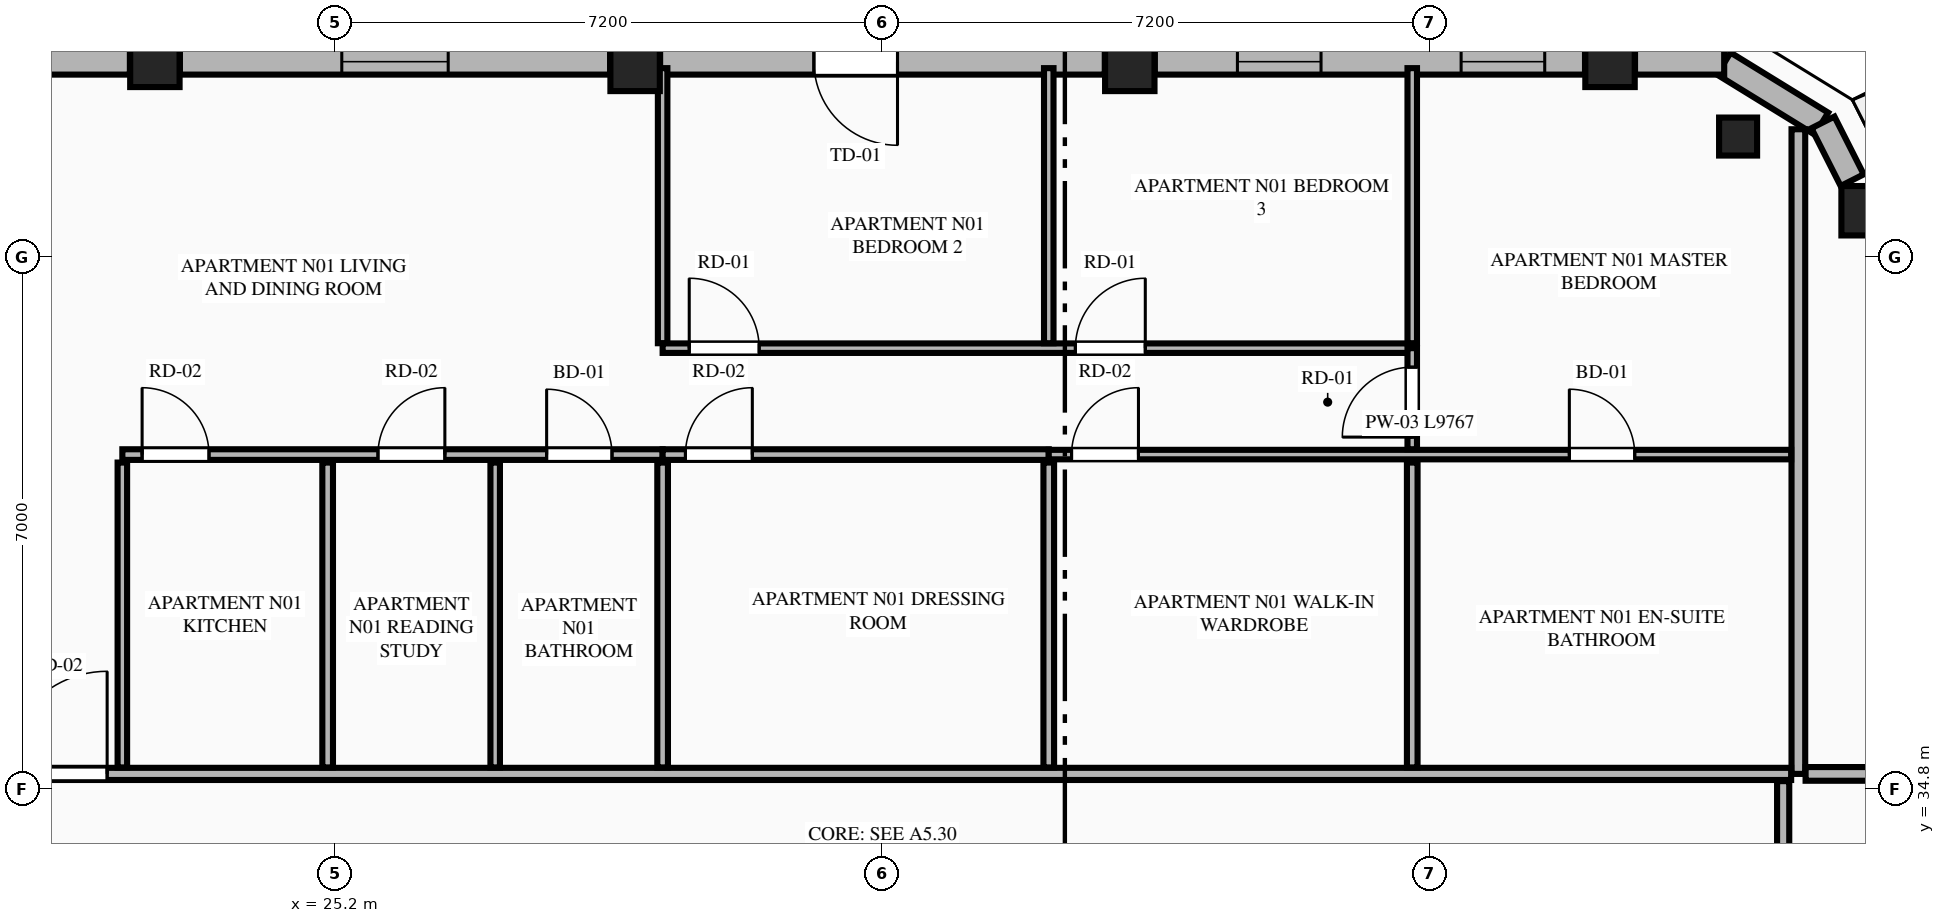
"""IFC4 building model, lengths in metres.
Left out: names, types, materials, properties, quantities, classifications, styles, units other than length and angle.
Written with IfcOpenShell. Run it as: python <this file> out.ifc"""

import sys

from ifc_helpers import new_model, si_unit, direction, frame, frame_2d, origin, origin_2d, place, context, subcontext, project, spatial, rectangle, extrude, element, fill, save


model = new_model("IFC4")
c1 = context("Model", 3, precision=1e-05, world=origin(), true_north=direction((0.0, 1.0)))
c2 = subcontext(c1, "Body", "Model", "MODEL_VIEW")
j1 = project(units=[si_unit("LENGTHUNIT", "METRE"), si_unit("PLANEANGLEUNIT", "RADIAN")], contexts=[c1])
p1 = place(None, origin())
s1 = spatial("IfcSite", under=j1, at=p1, CompositionType="ELEMENT")
p2 = place(p1, origin())
s2 = spatial("IfcBuilding", under=s1, at=p2, CompositionType="ELEMENT")
p3 = place(p2, frame((0.0, 0.0, 267.15)))
s3 = spatial("IfcBuildingStorey", under=s2, at=p3, CompositionType="ELEMENT", Elevation=267.15)
for number, where, z_axis, x_axis in (
    (1, (45.341, 42.409, 0.0), (0.0, 0.0, 1.0), (1.0, 0.0, 0.0)),
    (2, (41.972, 44.361, 0.0), (0.0, 0.0, 1.0), (1.0, 0.0, 0.0)),
    (3, (35.654, 44.308, 0.0), (0.0, 0.0, 1.0), (1.0, 0.0, 0.0)),
    (4, (29.146, 44.308, 0.0), (0.0, 0.0, 1.0), (1.0, 0.0, 0.0)),
    (5, (22.828, 44.361, 0.0), (0.0, 0.0, 1.0), (1.0, 0.0, 0.0)),
):
    element("IfcColumn", number, at=place(p3, frame(where, z_axis=z_axis, x_axis=x_axis)), inside=s3, PredefinedType="COLUMN", context=c2, shape_type="SweptSolid", body=[
        extrude(rectangle(XDim=0.65, YDim=0.65, at=origin_2d()), origin(), (0.0, 0.0, 1.0), 3.65),
    ])
p4 = place(p3, frame((43.657, 43.385, 0.0), z_axis=(0.0, 0.0, 1.0), x_axis=(-0.865256437757, 0.501329529272, 0.0)))
e6 = element("IfcColumn", 6, at=p4, inside=s3, PredefinedType="PILASTER", context=c2, shape_type="SweptSolid", body=[
    extrude(rectangle(XDim=0.5, YDim=0.35, at=origin_2d()), origin(), (0.0, 0.0, 1.0), 3.65),
])
p5 = place(p3, frame((44.753, 43.555, 0.0), z_axis=(0.0, 0.0, 1.0), x_axis=(-0.851680557619, 0.52406128246, 0.0)))
e7 = element("IfcWall", 7, at=p5, inside=s3, PredefinedType="STANDARD", context=c2, shape_type="SweptSolid", body=[
    extrude(rectangle(XDim=1.508, YDim=0.34, at=frame_2d((0.754, 0.0))), origin(), (0.0, 0.0, 1.0), 3.45),
])
p6 = place(p3, frame((45.158, 42.811, 0.0), z_axis=(0.0, 0.0, 1.0), x_axis=(-0.451907025977, 0.8920650424, 0.0)))
e8 = element("IfcWall", 8, at=p6, inside=s3, PredefinedType="STANDARD", context=c2, shape_type="SweptSolid", body=[
    extrude(rectangle(XDim=0.852, YDim=0.34, at=frame_2d((0.426, 0.0))), origin(), (0.0, 0.0, 1.0), 3.45),
])
p7 = place(p3, frame((43.474, 44.37, 0.0), z_axis=(0.0, 0.0, 1.0), x_axis=(-1.0, 0.0, 0.0)))
e9 = element("IfcWall", 9, at=p7, inside=s3, PredefinedType="STANDARD", context=c2, shape_type="SweptSolid", body=[
    extrude(rectangle(XDim=1.173, YDim=0.34, at=frame_2d((0.586, 0.0))), origin(), (0.0, 0.0, 1.0), 3.45),
])
p8 = place(p3, frame((41.643, 44.37, 0.0), z_axis=(0.0, 0.0, 1.0), x_axis=(-1.0, 0.0, 0.0)))
e10 = element("IfcWall", 10, at=p8, inside=s3, PredefinedType="STANDARD", context=c2, shape_type="SweptSolid", body=[
    extrude(rectangle(XDim=5.66, YDim=0.34, at=frame_2d((2.83, 0.0))), origin(), (0.0, 0.0, 1.0), 2.983),
])
p9 = place(p8, frame((0.53, 0.0, 0.75)))
e11 = element("IfcOpeningElement", 11, at=p9, cuts=e10, PredefinedType="OPENING", context=c2, shape_type="SweptSolid", body=[
    extrude(rectangle(XDim=1.1, YDim=2.0, at=frame_2d((0.55, 1.0))), frame((0.0, 0.18, 0.0), z_axis=(0.0, -1.0, 0.0), x_axis=(1.0, 0.0, 0.0)), (0.0, 0.0, 1.0), 0.36),
])
p10 = place(p8, frame((3.473, 0.0, 0.75)))
e12 = element("IfcOpeningElement", 12, at=p10, cuts=e10, PredefinedType="OPENING", context=c2, shape_type="SweptSolid", body=[
    extrude(rectangle(XDim=1.1, YDim=2.0, at=frame_2d((0.55, 1.0))), frame((0.0, 0.18, 0.0), z_axis=(0.0, -1.0, 0.0), x_axis=(1.0, 0.0, 0.0)), (0.0, 0.0, 1.0), 0.36),
])
p11 = place(p3, frame((35.325, 44.37, 0.0), z_axis=(0.0, 0.0, 1.0), x_axis=(-1.0, 0.0, 0.0)))
e13 = element("IfcWall", 13, at=p11, inside=s3, PredefinedType="STANDARD", context=c2, shape_type="SweptSolid", body=[
    extrude(rectangle(XDim=5.85, YDim=0.34, at=frame_2d((2.925, 0.0))), origin(), (0.0, 0.0, 1.0), 2.983),
])
p12 = place(p11, frame((2.727, 0.0, 0.0)))
e14 = element("IfcOpeningElement", 14, at=p12, cuts=e13, PredefinedType="OPENING", context=c2, shape_type="SweptSolid", body=[
    extrude(rectangle(XDim=1.1, YDim=2.25, at=frame_2d((0.55, 1.125))), frame((0.0, 0.18, 0.0), z_axis=(0.0, -1.0, 0.0), x_axis=(1.0, 0.0, 0.0)), (0.0, 0.0, 1.0), 0.36),
])
p13 = place(p3, frame((28.817, 44.37, 0.0), z_axis=(0.0, 0.0, 1.0), x_axis=(-1.0, 0.0, 0.0)))
e15 = element("IfcWall", 15, at=p13, inside=s3, PredefinedType="STANDARD", context=c2, shape_type="SweptSolid", body=[
    extrude(rectangle(XDim=5.66, YDim=0.34, at=frame_2d((2.83, 0.0))), origin(), (0.0, 0.0, 1.0), 2.983),
])
p14 = place(p13, frame((2.13, 0.0, 0.75)))
e16 = element("IfcOpeningElement", 16, at=p14, cuts=e15, PredefinedType="OPENING", context=c2, shape_type="SweptSolid", body=[
    extrude(rectangle(XDim=1.4, YDim=2.05, at=frame_2d((0.7, 1.025))), frame((0.0, 0.18, 0.0), z_axis=(0.0, -1.0, 0.0), x_axis=(1.0, 0.0, 0.0)), (0.0, 0.0, 1.0), 0.36),
])
p15 = place(p3, frame((22.499, 44.37, 0.0), z_axis=(0.0, 0.0, 1.0), x_axis=(-1.0, 0.0, 0.0)))
e17 = element("IfcWall", 17, at=p15, inside=s3, PredefinedType="STANDARD", context=c2, shape_type="SweptSolid", body=[
    extrude(rectangle(XDim=1.173, YDim=0.34, at=frame_2d((0.586, 0.0))), origin(), (0.0, 0.0, 1.0), 3.45),
])
p16 = place(p3, frame((44.45, 35.0, 0.0), z_axis=(0.0, 0.0, 1.0), x_axis=(0.0, 1.0, 0.0)))
e18 = element("IfcWall", 18, at=p16, inside=s3, PredefinedType="PARTITIONING", context=c2, shape_type="SweptSolid", body=[
    extrude(rectangle(XDim=8.481, YDim=0.18, at=frame_2d((4.24, 0.0))), origin(), (0.0, 0.0, 1.0), 3.45),
])
p17 = place(p3, frame((20.445, 35.0, 0.0), z_axis=(0.0, 0.0, 1.0), x_axis=(1.0, 0.0, 0.0)))
e19 = element("IfcWall", 19, at=p17, inside=s3, PredefinedType="PARTITIONING", context=c2, shape_type="SweptSolid", body=[
    extrude(rectangle(XDim=23.91, YDim=0.16, at=frame_2d((11.955, 0.0))), origin(), (0.0, 0.0, 1.0), 3.45),
])
p18 = place(p17, frame((0.405, 0.0, 0.0)))
e20 = element("IfcOpeningElement", 20, at=p18, cuts=e19, PredefinedType="OPENING", context=c2, shape_type="SweptSolid", body=[
    extrude(rectangle(XDim=1.35, YDim=2.35, at=frame_2d((0.675, 1.175))), frame((0.0, 0.09, 0.0), z_axis=(0.0, -1.0, 0.0), x_axis=(1.0, 0.0, 0.0)), (0.0, 0.0, 1.0), 0.18),
])
p19 = place(p3, frame((22.4, 35.085, 0.0), z_axis=(0.0, 0.0, 1.0), x_axis=(0.0, 1.0, 0.0)))
e21 = element("IfcWall", 21, at=p19, inside=s3, PredefinedType="PARTITIONING", context=c2, shape_type="SweptSolid", body=[
    extrude(rectangle(XDim=4.011, YDim=0.125, at=frame_2d((2.005, 0.0))), origin(), (0.0, 0.0, 1.0), 3.45),
])
p20 = place(p3, frame((22.4, 39.201, 0.0), z_axis=(0.0, 0.0, 1.0), x_axis=(1.0, 0.0, 0.0)))
e22 = element("IfcWall", 22, at=p20, inside=s3, PredefinedType="PLUMBINGWALL", context=c2, shape_type="SweptSolid", body=[
    extrude(rectangle(XDim=7.108, YDim=0.14, at=frame_2d((3.554, 0.0))), origin(), (0.0, 0.0, 1.0), 3.45),
])
p21 = place(p20, frame((5.582, 0.0, 0.0)))
e23 = element("IfcOpeningElement", 23, at=p21, cuts=e22, PredefinedType="OPENING", context=c2, shape_type="SweptSolid", body=[
    extrude(rectangle(XDim=0.86, YDim=2.1, at=frame_2d((0.43, 1.05))), frame((0.0, 0.08, 0.0), z_axis=(0.0, -1.0, 0.0), x_axis=(1.0, 0.0, 0.0)), (0.0, 0.0, 1.0), 0.16),
])
p22 = place(p20, frame((0.26, 0.0, 0.0)))
e24 = element("IfcOpeningElement", 24, at=p22, cuts=e22, PredefinedType="OPENING", context=c2, shape_type="SweptSolid", body=[
    extrude(rectangle(XDim=0.88, YDim=2.15, at=frame_2d((0.44, 1.075))), frame((0.0, 0.08, 0.0), z_axis=(0.0, -1.0, 0.0), x_axis=(1.0, 0.0, 0.0)), (0.0, 0.0, 1.0), 0.16),
])
p23 = place(p20, frame((3.363, 0.0, 0.0)))
e25 = element("IfcOpeningElement", 25, at=p23, cuts=e22, PredefinedType="OPENING", context=c2, shape_type="SweptSolid", body=[
    extrude(rectangle(XDim=0.88, YDim=2.15, at=frame_2d((0.44, 1.075))), frame((0.0, 0.08, 0.0), z_axis=(0.0, -1.0, 0.0), x_axis=(1.0, 0.0, 0.0)), (0.0, 0.0, 1.0), 0.16),
])
p24 = place(p3, frame((29.508, 39.201, 0.0), z_axis=(0.0, 0.0, 1.0), x_axis=(1.0, 0.0, 0.0)))
e26 = element("IfcWall", 26, at=p24, inside=s3, PredefinedType="PLUMBINGWALL", context=c2, shape_type="SweptSolid", body=[
    extrude(rectangle(XDim=5.08, YDim=0.14, at=frame_2d((2.54, 0.0))), origin(), (0.0, 0.0, 1.0), 3.45),
])
p25 = place(p24, frame((0.3, 0.0, 0.0)))
e27 = element("IfcOpeningElement", 27, at=p25, cuts=e26, PredefinedType="OPENING", context=c2, shape_type="SweptSolid", body=[
    extrude(rectangle(XDim=0.88, YDim=2.15, at=frame_2d((0.44, 1.075))), frame((0.0, 0.08, 0.0), z_axis=(0.0, -1.0, 0.0), x_axis=(1.0, 0.0, 0.0)), (0.0, 0.0, 1.0), 0.16),
])
p26 = place(p3, frame((34.588, 39.201, 0.0), z_axis=(0.0, 0.0, 1.0), x_axis=(1.0, 0.0, 0.0)))
e28 = element("IfcWall", 28, at=p26, inside=s3, PredefinedType="PARTITIONING", context=c2, shape_type="SweptSolid", body=[
    extrude(rectangle(XDim=9.767, YDim=0.125, at=frame_2d((4.884, 0.0))), origin(), (0.0, 0.0, 1.0), 3.45),
])
p27 = place(p26, frame((6.849, 0.0, 0.0)))
e29 = element("IfcOpeningElement", 29, at=p27, cuts=e28, PredefinedType="OPENING", context=c2, shape_type="SweptSolid", body=[
    extrude(rectangle(XDim=0.86, YDim=2.1, at=frame_2d((0.43, 1.05))), frame((0.0, 0.073, 0.0), z_axis=(0.0, -1.0, 0.0), x_axis=(1.0, 0.0, 0.0)), (0.0, 0.0, 1.0), 0.145),
])
p28 = place(p26, frame((0.3, 0.0, 0.0)))
e30 = element("IfcOpeningElement", 30, at=p28, cuts=e28, PredefinedType="OPENING", context=c2, shape_type="SweptSolid", body=[
    extrude(rectangle(XDim=0.88, YDim=2.15, at=frame_2d((0.44, 1.075))), frame((0.0, 0.073, 0.0), z_axis=(0.0, -1.0, 0.0), x_axis=(1.0, 0.0, 0.0)), (0.0, 0.0, 1.0), 0.145),
])
p29 = place(p3, frame((25.101, 35.085, 0.0), z_axis=(0.0, 0.0, 1.0), x_axis=(0.0, 1.0, 0.0)))
e31 = element("IfcWall", 31, at=p29, inside=s3, PredefinedType="PLUMBINGWALL", context=c2, shape_type="SweptSolid", body=[
    extrude(rectangle(XDim=4.011, YDim=0.14, at=frame_2d((2.005, 0.0))), origin(), (0.0, 0.0, 1.0), 3.45),
])
p30 = place(p3, frame((27.305, 35.085, 0.0), z_axis=(0.0, 0.0, 1.0), x_axis=(0.0, 1.0, 0.0)))
e32 = element("IfcWall", 32, at=p30, inside=s3, PredefinedType="PARTITIONING", context=c2, shape_type="SweptSolid", body=[
    extrude(rectangle(XDim=4.011, YDim=0.125, at=frame_2d((2.005, 0.0))), origin(), (0.0, 0.0, 1.0), 3.45),
])
p31 = place(p3, frame((29.508, 40.666, 0.0), z_axis=(0.0, 0.0, 1.0), x_axis=(0.0, 1.0, 0.0)))
e33 = element("IfcWall", 33, at=p31, inside=s3, PredefinedType="PARTITIONING", context=c2, shape_type="SweptSolid", body=[
    extrude(rectangle(XDim=3.619, YDim=0.125, at=frame_2d((1.81, 0.0))), origin(), (0.0, 0.0, 1.0), 3.45),
])
p32 = place(p3, frame((29.508, 40.601, 0.0), z_axis=(0.0, 0.0, 1.0), x_axis=(1.0, 0.0, 0.0)))
e34 = element("IfcWall", 34, at=p32, inside=s3, PredefinedType="PARTITIONING", context=c2, shape_type="SweptSolid", body=[
    extrude(rectangle(XDim=9.862, YDim=0.125, at=frame_2d((4.931, 0.0))), origin(), (0.0, 0.0, 1.0), 3.45),
])
p33 = place(p32, frame((0.35, 0.0, 0.0)))
e35 = element("IfcOpeningElement", 35, at=p33, cuts=e34, PredefinedType="OPENING", context=c2, shape_type="SweptSolid", body=[
    extrude(rectangle(XDim=0.92, YDim=2.15, at=frame_2d((0.46, 1.075))), frame((0.0, 0.073, 0.0), z_axis=(0.0, -1.0, 0.0), x_axis=(1.0, 0.0, 0.0)), (0.0, 0.0, 1.0), 0.145),
])
p34 = place(p32, frame((5.43, 0.0, 0.0)))
e36 = element("IfcOpeningElement", 36, at=p34, cuts=e34, PredefinedType="OPENING", context=c2, shape_type="SweptSolid", body=[
    extrude(rectangle(XDim=0.92, YDim=2.15, at=frame_2d((0.46, 1.075))), frame((0.0, 0.073, 0.0), z_axis=(0.0, -1.0, 0.0), x_axis=(1.0, 0.0, 0.0)), (0.0, 0.0, 1.0), 0.145),
])
p35 = place(p3, frame((39.37, 39.271, 0.0), z_axis=(0.0, 0.0, 1.0), x_axis=(0.0, 1.0, 0.0)))
e37 = element("IfcWall", 37, at=p35, inside=s3, PredefinedType="PARTITIONING", context=c2, shape_type="SweptSolid", body=[
    extrude(rectangle(XDim=1.33, YDim=0.125, at=frame_2d((0.665, 0.0))), origin(), (0.0, 0.0, 1.0), 3.45),
])
p36 = place(p35, frame((0.16, 0.0, 0.0)))
e38 = element("IfcOpeningElement", 38, at=p36, cuts=e37, PredefinedType="OPENING", context=c2, shape_type="SweptSolid", body=[
    extrude(rectangle(XDim=0.92, YDim=2.15, at=frame_2d((0.46, 1.075))), frame((0.0, 0.073, 0.0), z_axis=(0.0, -1.0, 0.0), x_axis=(1.0, 0.0, 0.0)), (0.0, 0.0, 1.0), 0.145),
])
for number, where, z_axis, x_axis in (
    (39, (29.508, 35.085, 0.0), (0.0, 0.0, 1.0), (0.0, 1.0, 0.0)),
    (40, (34.588, 35.085, 0.0), (0.0, 0.0, 1.0), (0.0, 1.0, 0.0)),
):
    element("IfcWall", number, at=place(p3, frame(where, z_axis=z_axis, x_axis=x_axis)), inside=s3, PredefinedType="PLUMBINGWALL", context=c2, shape_type="SweptSolid", body=[
        extrude(rectangle(XDim=4.011, YDim=0.14, at=frame_2d((2.005, 0.0))), origin(), (0.0, 0.0, 1.0), 3.45),
    ])
for number, where, z_axis, x_axis in (
    (41, (34.588, 40.666, 0.0), (0.0, 0.0, 1.0), (0.0, 1.0, 0.0)),
    (42, (39.37, 40.666, 0.0), (0.0, 0.0, 1.0), (0.0, 1.0, 0.0)),
):
    element("IfcWall", number, at=place(p3, frame(where, z_axis=z_axis, x_axis=x_axis)), inside=s3, PredefinedType="PARTITIONING", context=c2, shape_type="SweptSolid", body=[
        extrude(rectangle(XDim=3.619, YDim=0.125, at=frame_2d((1.81, 0.0))), origin(), (0.0, 0.0, 1.0), 3.45),
    ])
p37 = place(p3, frame((39.37, 35.085, 0.0), z_axis=(0.0, 0.0, 1.0), x_axis=(0.0, 1.0, 0.0)))
e43 = element("IfcWall", 43, at=p37, inside=s3, PredefinedType="PLUMBINGWALL", context=c2, shape_type="SweptSolid", body=[
    extrude(rectangle(XDim=4.011, YDim=0.14, at=frame_2d((2.005, 0.0))), origin(), (0.0, 0.0, 1.0), 3.45),
])
p38 = place(p3, frame((44.545, 35.0, 0.0), z_axis=(0.0, 0.0, 1.0), x_axis=(1.0, 0.0, 0.0)))
e44 = element("IfcWall", 44, at=p38, inside=s3, PredefinedType="PARTITIONING", context=c2, shape_type="SweptSolid", body=[
    extrude(rectangle(XDim=4.322, YDim=0.18, at=frame_2d((2.161, 0.0))), origin(), (0.0, 0.0, 1.0), 3.45),
])
p39 = place(p3, frame((44.25, 16.495, 0.0), z_axis=(0.0, 0.0, 1.0), x_axis=(0.0, 1.0, 0.0)))
e45 = element("IfcWall", 45, at=p39, inside=s3, PredefinedType="PARTITIONING", context=c2, shape_type="SweptSolid", body=[
    extrude(rectangle(XDim=18.41, YDim=0.16, at=frame_2d((9.205, 0.0))), origin(), (0.0, 0.0, 1.0), 3.137),
])
p40 = place(p39, frame((0.4, 0.0, 0.0)))
e46 = element("IfcOpeningElement", 46, at=p40, cuts=e45, PredefinedType="OPENING", context=c2, shape_type="SweptSolid", body=[
    extrude(rectangle(XDim=1.02, YDim=2.25, at=frame_2d((0.51, 1.125))), frame((0.0, 0.09, 0.0), z_axis=(0.0, -1.0, 0.0), x_axis=(1.0, 0.0, 0.0)), (0.0, 0.0, 1.0), 0.18),
])
p41 = place(p9, origin())
e47 = element("IfcWindow", 47, at=p41, inside=s3, PartitioningType="SINGLE_PANEL", PredefinedType="WINDOW", context=c2, shape_type="SweptSolid", body=[
    extrude(rectangle(XDim=1.1, YDim=2.0, at=frame_2d((0.55, 1.0))), frame((0.0, 0.03, 0.0), z_axis=(0.0, -1.0, 0.0), x_axis=(1.0, 0.0, 0.0)), (0.0, 0.0, 1.0), 0.06),
])
fill(e11, e47)
p42 = place(p12, origin())
e48 = element("IfcDoor", 48, at=p42, inside=s3, OperationType="SINGLE_SWING_LEFT", PredefinedType="DOOR", context=c2, shape_type="SweptSolid", body=[
    extrude(rectangle(XDim=1.1, YDim=2.25, at=frame_2d((0.55, 1.125))), frame((0.0, 0.025, 0.0), z_axis=(0.0, -1.0, 0.0), x_axis=(1.0, 0.0, 0.0)), (0.0, 0.0, 1.0), 0.05),
])
fill(e14, e48)
p43 = place(p14, origin())
e49 = element("IfcWindow", 49, at=p43, inside=s3, PartitioningType="SINGLE_PANEL", PredefinedType="WINDOW", context=c2, shape_type="SweptSolid", body=[
    extrude(rectangle(XDim=1.4, YDim=2.05, at=frame_2d((0.7, 1.025))), frame((0.0, 0.03, 0.0), z_axis=(0.0, -1.0, 0.0), x_axis=(1.0, 0.0, 0.0)), (0.0, 0.0, 1.0), 0.06),
])
fill(e16, e49)
p44 = place(p21, origin())
e50 = element("IfcDoor", 50, at=p44, inside=s3, OperationType="SINGLE_SWING_LEFT", PredefinedType="DOOR", context=c2, shape_type="SweptSolid", body=[
    extrude(rectangle(XDim=0.86, YDim=2.1, at=frame_2d((0.43, 1.05))), frame((0.0, 0.025, 0.0), z_axis=(0.0, -1.0, 0.0), x_axis=(1.0, 0.0, 0.0)), (0.0, 0.0, 1.0), 0.05),
])
fill(e23, e50)
p45 = place(p27, origin())
e51 = element("IfcDoor", 51, at=p45, inside=s3, OperationType="SINGLE_SWING_LEFT", PredefinedType="DOOR", context=c2, shape_type="SweptSolid", body=[
    extrude(rectangle(XDim=0.86, YDim=2.1, at=frame_2d((0.43, 1.05))), frame((0.0, 0.025, 0.0), z_axis=(0.0, -1.0, 0.0), x_axis=(1.0, 0.0, 0.0)), (0.0, 0.0, 1.0), 0.05),
])
fill(e29, e51)
p46 = place(p18, origin())
e52 = element("IfcDoor", 52, at=p46, inside=s3, OperationType="SINGLE_SWING_RIGHT", PredefinedType="DOOR", context=c2, shape_type="SweptSolid", body=[
    extrude(rectangle(XDim=1.35, YDim=2.35, at=frame_2d((0.675, 1.175))), frame((0.0, 0.025, 0.0), z_axis=(0.0, -1.0, 0.0), x_axis=(1.0, 0.0, 0.0)), (0.0, 0.0, 1.0), 0.05),
])
fill(e20, e52)
p47 = place(p22, origin())
e53 = element("IfcDoor", 53, at=p47, inside=s3, OperationType="SINGLE_SWING_LEFT", PredefinedType="DOOR", context=c2, shape_type="SweptSolid", body=[
    extrude(rectangle(XDim=0.88, YDim=2.15, at=frame_2d((0.44, 1.075))), frame((0.0, 0.025, 0.0), z_axis=(0.0, -1.0, 0.0), x_axis=(1.0, 0.0, 0.0)), (0.0, 0.0, 1.0), 0.05),
])
fill(e24, e53)
p48 = place(p23, origin())
e54 = element("IfcDoor", 54, at=p48, inside=s3, OperationType="SINGLE_SWING_RIGHT", PredefinedType="DOOR", context=c2, shape_type="SweptSolid", body=[
    extrude(rectangle(XDim=0.88, YDim=2.15, at=frame_2d((0.44, 1.075))), frame((0.0, 0.025, 0.0), z_axis=(0.0, -1.0, 0.0), x_axis=(1.0, 0.0, 0.0)), (0.0, 0.0, 1.0), 0.05),
])
fill(e25, e54)
p49 = place(p25, origin())
e55 = element("IfcDoor", 55, at=p49, inside=s3, OperationType="SINGLE_SWING_RIGHT", PredefinedType="DOOR", context=c2, shape_type="SweptSolid", body=[
    extrude(rectangle(XDim=0.88, YDim=2.15, at=frame_2d((0.44, 1.075))), frame((0.0, 0.025, 0.0), z_axis=(0.0, -1.0, 0.0), x_axis=(1.0, 0.0, 0.0)), (0.0, 0.0, 1.0), 0.05),
])
fill(e27, e55)
p50 = place(p33, origin())
e56 = element("IfcDoor", 56, at=p50, inside=s3, OperationType="SINGLE_SWING_LEFT", PredefinedType="DOOR", context=c2, shape_type="SweptSolid", body=[
    extrude(rectangle(XDim=0.92, YDim=2.15, at=frame_2d((0.46, 1.075))), frame((0.0, 0.025, 0.0), z_axis=(0.0, -1.0, 0.0), x_axis=(1.0, 0.0, 0.0)), (0.0, 0.0, 1.0), 0.05),
])
fill(e35, e56)
p51 = place(p34, origin())
e57 = element("IfcDoor", 57, at=p51, inside=s3, OperationType="SINGLE_SWING_RIGHT", PredefinedType="DOOR", context=c2, shape_type="SweptSolid", body=[
    extrude(rectangle(XDim=0.92, YDim=2.15, at=frame_2d((0.46, 1.075))), frame((0.0, 0.025, 0.0), z_axis=(0.0, -1.0, 0.0), x_axis=(1.0, 0.0, 0.0)), (0.0, 0.0, 1.0), 0.05),
])
fill(e36, e57)
p52 = place(p36, origin())
e58 = element("IfcDoor", 58, at=p52, inside=s3, OperationType="SINGLE_SWING_LEFT", PredefinedType="DOOR", context=c2, shape_type="SweptSolid", body=[
    extrude(rectangle(XDim=0.92, YDim=2.15, at=frame_2d((0.46, 1.075))), frame((0.0, 0.025, 0.0), z_axis=(0.0, -1.0, 0.0), x_axis=(1.0, 0.0, 0.0)), (0.0, 0.0, 1.0), 0.05),
])
fill(e38, e58)
p53 = place(p28, origin())
e59 = element("IfcDoor", 59, at=p53, inside=s3, OperationType="SINGLE_SWING_RIGHT", PredefinedType="DOOR", context=c2, shape_type="SweptSolid", body=[
    extrude(rectangle(XDim=0.88, YDim=2.15, at=frame_2d((0.44, 1.075))), frame((0.0, 0.025, 0.0), z_axis=(0.0, -1.0, 0.0), x_axis=(1.0, 0.0, 0.0)), (0.0, 0.0, 1.0), 0.05),
])
fill(e30, e59)
p54 = place(p10, origin())
e60 = element("IfcWindow", 60, at=p54, inside=s3, PartitioningType="SINGLE_PANEL", PredefinedType="WINDOW", context=c2, shape_type="SweptSolid", body=[
    extrude(rectangle(XDim=1.1, YDim=2.0, at=frame_2d((0.55, 1.0))), frame((0.0, 0.03, 0.0), z_axis=(0.0, -1.0, 0.0), x_axis=(1.0, 0.0, 0.0)), (0.0, 0.0, 1.0), 0.06),
])
fill(e12, e60)
save(model, sys.argv[1])
